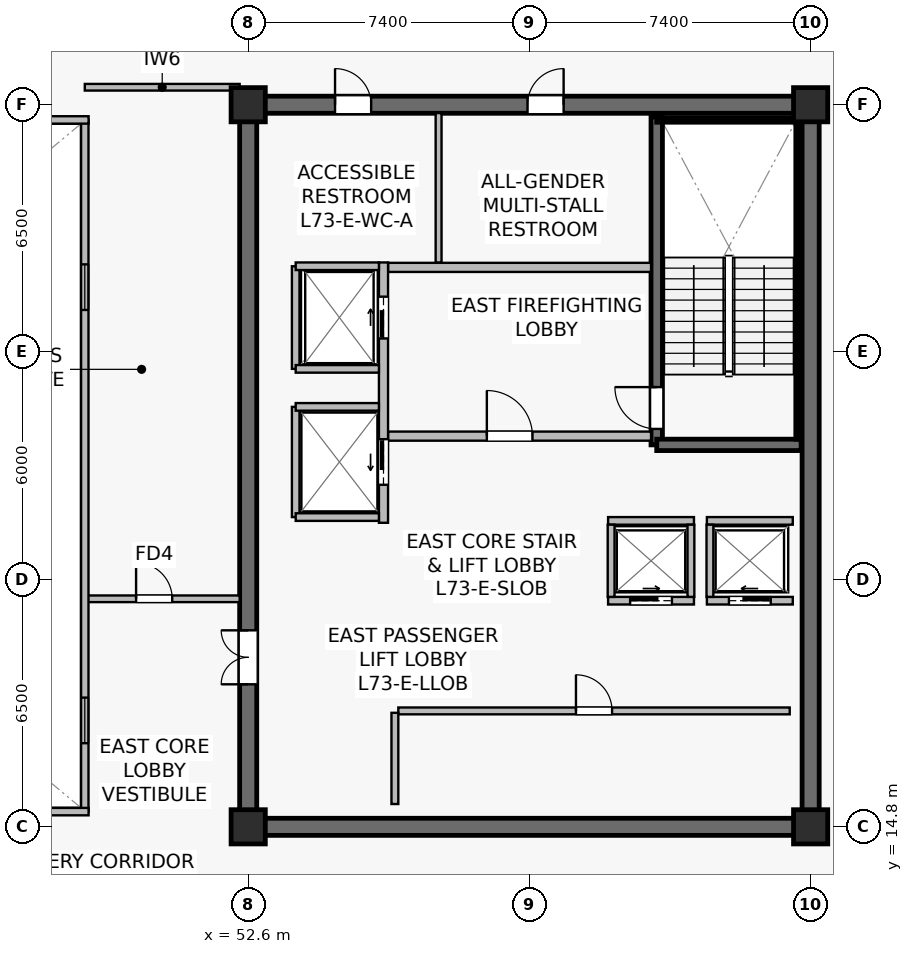
"""IFC4 building model, lengths in metres.
Left out: names, types, materials, properties, quantities, classifications, styles, units other than length and angle.
Written with IfcOpenShell. Run it as: python <this file> out.ifc"""

import sys

from ifc_helpers import new_model, si_unit, direction, frame, frame_2d, origin, origin_2d, place, context, subcontext, project, spatial, rectangle, extrude, source, transform, mapped, element, fill, save


model = new_model("IFC4")
c1 = context("Model", 3, precision=1e-05, world=origin(), true_north=direction((0.0, 1.0)))
c2 = subcontext(c1, "Body", "Model", "MODEL_VIEW")
j1 = project(units=[si_unit("LENGTHUNIT", "METRE"), si_unit("PLANEANGLEUNIT", "RADIAN")], contexts=[c1])
p1 = place(None, origin())
s1 = spatial("IfcSite", under=j1, at=p1, CompositionType="ELEMENT")
p2 = place(p1, origin())
s2 = spatial("IfcBuilding", under=s1, at=p2, CompositionType="ELEMENT")
p3 = place(p2, frame((0.0, 0.0, 306.0)))
s3 = spatial("IfcBuildingStorey", under=s2, at=p3, CompositionType="ELEMENT", Elevation=306.0)
p4 = place(p3, frame((52.375, 14.8, 0.0), z_axis=(0.0, 0.0, 1.0), x_axis=(1.0, 0.0, 0.0)))
e1 = element("IfcWall", 1, at=p4, inside=s3, PredefinedType="SHEAR", context=c2, shape_type="SweptSolid", body=[
    extrude(rectangle(XDim=15.25, YDim=0.45, at=frame_2d((7.625, 0.0))), origin(), (0.0, 0.0, 1.0), 3.9),
])
p5 = place(p3, frame((52.375, 33.8, 0.0), z_axis=(0.0, 0.0, 1.0), x_axis=(1.0, 0.0, 0.0)))
e2 = element("IfcWall", 2, at=p5, inside=s3, PredefinedType="SHEAR", context=c2, shape_type="SweptSolid", body=[
    extrude(rectangle(XDim=15.25, YDim=0.45, at=frame_2d((7.625, 0.0))), origin(), (0.0, 0.0, 1.0), 3.9),
])
p6 = place(p5, frame((7.575, 0.0, 0.0)))
e3 = element("IfcOpeningElement", 3, at=p6, cuts=e2, PredefinedType="OPENING", context=c2, shape_type="SweptSolid", body=[
    extrude(rectangle(XDim=0.95, YDim=2.15, at=frame_2d((0.475, 1.075))), frame((0.0, 0.235, 0.0), z_axis=(0.0, -1.0, 0.0), x_axis=(1.0, 0.0, 0.0)), (0.0, 0.0, 1.0), 0.47),
])
p7 = place(p5, frame((2.51, 0.0, 0.0)))
e4 = element("IfcOpeningElement", 4, at=p7, cuts=e2, PredefinedType="OPENING", context=c2, shape_type="SweptSolid", body=[
    extrude(rectangle(XDim=0.95, YDim=2.15, at=frame_2d((0.475, 1.075))), frame((0.0, 0.235, 0.0), z_axis=(0.0, -1.0, 0.0), x_axis=(1.0, 0.0, 0.0)), (0.0, 0.0, 1.0), 0.47),
])
p8 = place(p3, frame((52.6, 15.025, 0.0), z_axis=(0.0, 0.0, 1.0), x_axis=(0.0, 1.0, 0.0)))
e5 = element("IfcWall", 5, at=p8, inside=s3, PredefinedType="SHEAR", context=c2, shape_type="SweptSolid", body=[
    extrude(rectangle(XDim=18.55, YDim=0.45, at=frame_2d((9.275, 0.0))), origin(), (0.0, 0.0, 1.0), 3.9),
])
p9 = place(p8, frame((3.525, 0.0, 0.0)))
e6 = element("IfcOpeningElement", 6, at=p9, cuts=e5, PredefinedType="OPENING", context=c2, shape_type="SweptSolid", body=[
    extrude(rectangle(XDim=1.42, YDim=2.2, at=frame_2d((0.71, 1.1))), frame((0.0, 0.235, 0.0), z_axis=(0.0, -1.0, 0.0), x_axis=(1.0, 0.0, 0.0)), (0.0, 0.0, 1.0), 0.47),
])
p10 = place(p3, frame((67.4, 15.025, 0.0), z_axis=(0.0, 0.0, 1.0), x_axis=(0.0, 1.0, 0.0)))
e7 = element("IfcWall", 7, at=p10, inside=s3, PredefinedType="SHEAR", context=c2, shape_type="SweptSolid", body=[
    extrude(rectangle(XDim=18.55, YDim=0.45, at=frame_2d((9.275, 0.0))), origin(), (0.0, 0.0, 1.0), 3.9),
])
p11 = place(p3, frame((63.35, 24.85, 0.0), z_axis=(0.0, 0.0, 1.0), x_axis=(0.0, 1.0, 0.0)))
e8 = element("IfcWall", 8, at=p11, inside=s3, PredefinedType="SHEAR", context=c2, shape_type="SweptSolid", body=[
    extrude(rectangle(XDim=8.63, YDim=0.3, at=frame_2d((4.315, 0.0))), origin(), (0.0, 0.0, 1.0), 3.9),
])
p12 = place(p11, frame((0.42, 0.0, 0.0)))
e9 = element("IfcOpeningElement", 9, at=p12, cuts=e8, PredefinedType="OPENING", context=c2, shape_type="SweptSolid", body=[
    extrude(rectangle(XDim=1.1, YDim=2.15, at=frame_2d((0.55, 1.075))), frame((0.0, 0.16, 0.0), z_axis=(0.0, -1.0, 0.0), x_axis=(1.0, 0.0, 0.0)), (0.0, 0.0, 1.0), 0.32),
])
p13 = place(p3, frame((63.35, 24.85, 0.0), z_axis=(0.0, 0.0, 1.0), x_axis=(1.0, 0.0, 0.0)))
e10 = element("IfcWall", 10, at=p13, inside=s3, PredefinedType="SHEAR", context=c2, shape_type="SweptSolid", body=[
    extrude(rectangle(XDim=3.8, YDim=0.3, at=frame_2d((1.9, 0.0))), origin(), (0.0, 0.0, 1.0), 3.9),
])
p14 = place(p3, frame((63.35, 33.4, 0.0), z_axis=(0.0, 0.0, 1.0), x_axis=(1.0, 0.0, 0.0)))
e11 = element("IfcWall", 11, at=p14, inside=s3, PredefinedType="SOLIDWALL", context=c2, shape_type="SweptSolid", body=[
    extrude(rectangle(XDim=3.72, YDim=0.12, at=frame_2d((1.86, 0.0))), origin(), (0.0, 0.0, 1.0), 3.9),
])
p15 = place(p3, frame((67.07, 25.0, 0.0), z_axis=(0.0, 0.0, 1.0), x_axis=(0.0, 1.0, 0.0)))
e12 = element("IfcWall", 12, at=p15, inside=s3, PredefinedType="SOLIDWALL", context=c2, shape_type="SweptSolid", body=[
    extrude(rectangle(XDim=8.32, YDim=0.12, at=frame_2d((4.16, 0.0))), origin(), (0.0, 0.0, 1.0), 3.9),
])
m1 = source(origin(), c2, "Body", "SweptSolid", [
    extrude(rectangle(XDim=0.9, YDim=0.9, at=origin_2d()), origin(), (0.0, 0.0, 1.0), 4.2),
])
for number, where, z_axis, x_axis in (
    (13, (52.6, 14.8, 0.0), (0.0, 0.0, 1.0), (1.0, 0.0, 0.0)),
    (14, (67.4, 14.8, 0.0), (0.0, 0.0, 1.0), (1.0, 0.0, 0.0)),
    (15, (52.6, 33.8, 0.0), (0.0, 0.0, 1.0), (1.0, 0.0, 0.0)),
    (16, (67.4, 33.8, 0.0), (0.0, 0.0, 1.0), (1.0, 0.0, 0.0)),
):
    element("IfcColumn", number, at=place(p3, frame(where, z_axis=z_axis, x_axis=x_axis)), inside=s3, PredefinedType="COLUMN", context=c2, shape_type="MappedRepresentation", body=[
        mapped(m1, transform((0.0, 0.0, 0.0), scale=1.0)),
    ])
p16 = place(p3, frame((56.28, 25.08, 0.0), z_axis=(0.0, 0.0, 1.0), x_axis=(1.0, 0.0, 0.0)))
e17 = element("IfcWall", 17, at=p16, inside=s3, PredefinedType="SOLIDWALL", context=c2, shape_type="SweptSolid", body=[
    extrude(rectangle(XDim=6.92, YDim=0.24, at=frame_2d((3.46, 0.0))), origin(), (0.0, 0.0, 1.0), 3.297),
])
p17 = place(p16, frame((2.6, 0.0, 0.0)))
e18 = element("IfcOpeningElement", 18, at=p17, cuts=e17, PredefinedType="OPENING", context=c2, shape_type="SweptSolid", body=[
    extrude(rectangle(XDim=1.2, YDim=2.16, at=frame_2d((0.6, 1.08))), frame((0.0, 0.13, 0.0), z_axis=(0.0, -1.0, 0.0), x_axis=(1.0, 0.0, 0.0)), (0.0, 0.0, 1.0), 0.26),
])
p18 = place(p3, frame((56.28, 29.52, 0.0), z_axis=(0.0, 0.0, 1.0), x_axis=(1.0, 0.0, 0.0)))
e19 = element("IfcWall", 19, at=p18, inside=s3, PredefinedType="SOLIDWALL", context=c2, shape_type="SweptSolid", body=[
    extrude(rectangle(XDim=6.92, YDim=0.24, at=frame_2d((3.46, 0.0))), origin(), (0.0, 0.0, 1.0), 3.297),
])
p19 = place(p3, frame((56.16, 22.8, 0.0), z_axis=(0.0, 0.0, 1.0), x_axis=(0.0, 1.0, 0.0)))
e20 = element("IfcWall", 20, at=p19, inside=s3, PredefinedType="SOLIDWALL", context=c2, shape_type="SweptSolid", body=[
    extrude(rectangle(XDim=6.85, YDim=0.24, at=frame_2d((3.425, 0.0))), origin(), (0.0, 0.0, 1.0), 3.035),
])
p20 = place(p19, frame((4.85, 0.0, 0.0)))
e21 = element("IfcOpeningElement", 21, at=p20, cuts=e20, PredefinedType="OPENING", context=c2, shape_type="SweptSolid", body=[
    extrude(rectangle(XDim=1.1, YDim=2.22, at=frame_2d((0.55, 1.11))), frame((0.0, 0.13, 0.0), z_axis=(0.0, -1.0, 0.0), x_axis=(1.0, 0.0, 0.0)), (0.0, 0.0, 1.0), 0.26),
])
p21 = place(p19, frame((1.0, 0.0, 0.0)))
e22 = element("IfcOpeningElement", 22, at=p21, cuts=e20, PredefinedType="OPENING", context=c2, shape_type="SweptSolid", body=[
    extrude(rectangle(XDim=1.2, YDim=2.22, at=frame_2d((0.6, 1.11))), frame((0.0, 0.13, 0.0), z_axis=(0.0, -1.0, 0.0), x_axis=(1.0, 0.0, 0.0)), (0.0, 0.0, 1.0), 0.26),
])
p22 = place(p3, frame((64.67, 20.75, 0.0), z_axis=(0.0, 0.0, 1.0), x_axis=(1.0, 0.0, 0.0)))
e23 = element("IfcWall", 23, at=p22, inside=s3, PredefinedType="SOLIDWALL", context=c2, shape_type="SweptSolid", body=[
    extrude(rectangle(XDim=2.26, YDim=0.2, at=frame_2d((1.13, 0.0))), origin(), (0.0, 0.0, 1.0), 3.9),
])
p23 = place(p22, frame((0.58, 0.0, 0.0)))
e24 = element("IfcOpeningElement", 24, at=p23, cuts=e23, PredefinedType="OPENING", context=c2, shape_type="SweptSolid", body=[
    extrude(rectangle(XDim=1.1, YDim=2.22, at=frame_2d((0.55, 1.11))), frame((0.0, 0.11, 0.0), z_axis=(0.0, -1.0, 0.0), x_axis=(1.0, 0.0, 0.0)), (0.0, 0.0, 1.0), 0.22),
])
p24 = place(p3, frame((64.67, 22.85, 0.0), z_axis=(0.0, 0.0, 1.0), x_axis=(1.0, 0.0, 0.0)))
e25 = element("IfcWall", 25, at=p24, inside=s3, PredefinedType="SOLIDWALL", context=c2, shape_type="SweptSolid", body=[
    extrude(rectangle(XDim=2.26, YDim=0.2, at=frame_2d((1.13, 0.0))), origin(), (0.0, 0.0, 1.0), 3.9),
])
p25 = place(p3, frame((64.75, 20.85, 0.0), z_axis=(0.0, 0.0, 1.0), x_axis=(0.0, 1.0, 0.0)))
e26 = element("IfcWall", 26, at=p25, inside=s3, PredefinedType="SOLIDWALL", context=c2, shape_type="SweptSolid", body=[
    extrude(rectangle(XDim=1.9, YDim=0.18, at=frame_2d((0.95, 0.0))), origin(), (0.0, 0.0, 1.0), 3.9),
])
p26 = place(p3, frame((62.07, 20.75, 0.0), z_axis=(0.0, 0.0, 1.0), x_axis=(1.0, 0.0, 0.0)))
e27 = element("IfcWall", 27, at=p26, inside=s3, PredefinedType="SOLIDWALL", context=c2, shape_type="SweptSolid", body=[
    extrude(rectangle(XDim=2.26, YDim=0.2, at=frame_2d((1.13, 0.0))), origin(), (0.0, 0.0, 1.0), 3.9),
])
p27 = place(p26, frame((0.58, 0.0, 0.0)))
e28 = element("IfcOpeningElement", 28, at=p27, cuts=e27, PredefinedType="OPENING", context=c2, shape_type="SweptSolid", body=[
    extrude(rectangle(XDim=1.1, YDim=2.22, at=frame_2d((0.55, 1.11))), frame((0.0, 0.11, 0.0), z_axis=(0.0, -1.0, 0.0), x_axis=(1.0, 0.0, 0.0)), (0.0, 0.0, 1.0), 0.22),
])
p28 = place(p3, frame((62.07, 22.85, 0.0), z_axis=(0.0, 0.0, 1.0), x_axis=(1.0, 0.0, 0.0)))
e29 = element("IfcWall", 29, at=p28, inside=s3, PredefinedType="SOLIDWALL", context=c2, shape_type="SweptSolid", body=[
    extrude(rectangle(XDim=2.26, YDim=0.2, at=frame_2d((1.13, 0.0))), origin(), (0.0, 0.0, 1.0), 3.9),
])
for number, where, z_axis, x_axis in (
    (30, (62.15, 20.85, 0.0), (0.0, 0.0, 1.0), (0.0, 1.0, 0.0)),
    (31, (64.25, 20.85, 0.0), (0.0, 0.0, 1.0), (0.0, 1.0, 0.0)),
):
    element("IfcWall", number, at=place(p3, frame(where, z_axis=z_axis, x_axis=x_axis)), inside=s3, PredefinedType="SOLIDWALL", context=c2, shape_type="SweptSolid", body=[
        extrude(rectangle(XDim=1.9, YDim=0.18, at=frame_2d((0.95, 0.0))), origin(), (0.0, 0.0, 1.0), 3.9),
    ])
p29 = place(p3, frame((53.85, 26.85, 0.0), z_axis=(0.0, 0.0, 1.0), x_axis=(0.0, 1.0, 0.0)))
e32 = element("IfcWall", 32, at=p29, inside=s3, PredefinedType="SOLIDWALL", context=c2, shape_type="SweptSolid", body=[
    extrude(rectangle(XDim=2.7, YDim=0.2, at=frame_2d((1.35, 0.0))), origin(), (0.0, 0.0, 1.0), 3.9),
])
p30 = place(p3, frame((53.85, 29.55, 0.0), z_axis=(0.0, 0.0, 1.0), x_axis=(1.0, 0.0, 0.0)))
e33 = element("IfcWall", 33, at=p30, inside=s3, PredefinedType="SOLIDWALL", context=c2, shape_type="SweptSolid", body=[
    extrude(rectangle(XDim=2.19, YDim=0.2, at=frame_2d((1.095, 0.0))), origin(), (0.0, 0.0, 1.0), 3.9),
])
p31 = place(p3, frame((53.85, 26.85, 0.0), z_axis=(0.0, 0.0, 1.0), x_axis=(1.0, 0.0, 0.0)))
e34 = element("IfcWall", 34, at=p31, inside=s3, PredefinedType="SOLIDWALL", context=c2, shape_type="SweptSolid", body=[
    extrude(rectangle(XDim=2.19, YDim=0.2, at=frame_2d((1.095, 0.0))), origin(), (0.0, 0.0, 1.0), 3.297),
])
p32 = place(p3, frame((53.85, 22.95, 0.0), z_axis=(0.0, 0.0, 1.0), x_axis=(0.0, 1.0, 0.0)))
e35 = element("IfcWall", 35, at=p32, inside=s3, PredefinedType="SOLIDWALL", context=c2, shape_type="SweptSolid", body=[
    extrude(rectangle(XDim=2.9, YDim=0.2, at=frame_2d((1.45, 0.0))), origin(), (0.0, 0.0, 1.0), 3.035),
])
for number, where, z_axis, x_axis in (
    (36, (53.85, 25.85, 0.0), (0.0, 0.0, 1.0), (1.0, 0.0, 0.0)),
    (37, (53.85, 22.95, 0.0), (0.0, 0.0, 1.0), (1.0, 0.0, 0.0)),
):
    element("IfcWall", number, at=place(p3, frame(where, z_axis=z_axis, x_axis=x_axis)), inside=s3, PredefinedType="SOLIDWALL", context=c2, shape_type="SweptSolid", body=[
        extrude(rectangle(XDim=2.19, YDim=0.2, at=frame_2d((1.095, 0.0))), origin(), (0.0, 0.0, 1.0), 3.9),
    ])
p33 = place(p3, frame((56.55, 17.85, 0.0), z_axis=(0.0, 0.0, 1.0), x_axis=(1.0, 0.0, 0.0)))
e38 = element("IfcWall", 38, at=p33, inside=s3, PredefinedType="SOLIDWALL", context=c2, shape_type="SweptSolid", body=[
    extrude(rectangle(XDim=10.3, YDim=0.18, at=frame_2d((5.15, 0.0))), origin(), (0.0, 0.0, 1.0), 3.297),
])
p34 = place(p33, frame((4.675, 0.0, 0.0)))
e39 = element("IfcOpeningElement", 39, at=p34, cuts=e38, PredefinedType="OPENING", context=c2, shape_type="SweptSolid", body=[
    extrude(rectangle(XDim=0.95, YDim=2.15, at=frame_2d((0.475, 1.075))), frame((0.0, 0.1, 0.0), z_axis=(0.0, -1.0, 0.0), x_axis=(1.0, 0.0, 0.0)), (0.0, 0.0, 1.0), 0.2),
])
p35 = place(p3, frame((56.46, 15.4, 0.0), z_axis=(0.0, 0.0, 1.0), x_axis=(0.0, 1.0, 0.0)))
e40 = element("IfcWall", 40, at=p35, inside=s3, PredefinedType="SOLIDWALL", context=c2, shape_type="SweptSolid", body=[
    extrude(rectangle(XDim=2.4, YDim=0.18, at=frame_2d((1.2, 0.0))), origin(), (0.0, 0.0, 1.0), 3.9),
])
p36 = place(p3, frame((57.61, 29.65, 0.0), z_axis=(0.0, 0.0, 1.0), x_axis=(0.0, 1.0, 0.0)))
e41 = element("IfcWall", 41, at=p36, inside=s3, PredefinedType="PLUMBINGWALL", context=c2, shape_type="SweptSolid", body=[
    extrude(rectangle(XDim=3.93, YDim=0.155, at=frame_2d((1.965, 0.0))), origin(), (0.0, 0.0, 1.0), 3.9),
])
p37 = place(p3, frame((48.3, 34.26, 0.0), z_axis=(0.0, 0.0, 1.0), x_axis=(1.0, 0.0, 0.0)))
e42 = element("IfcWall", 42, at=p37, inside=s3, PredefinedType="PARTITIONING", context=c2, shape_type="SweptSolid", body=[
    extrude(rectangle(XDim=4.075, YDim=0.175, at=frame_2d((2.038, 0.0))), origin(), (0.0, 0.0, 1.0), 3.635),
])
p38 = place(p3, frame((48.3, 20.8, 0.0), z_axis=(0.0, 0.0, 1.0), x_axis=(1.0, 0.0, 0.0)))
e43 = element("IfcWall", 43, at=p38, inside=s3, PredefinedType="PARTITIONING", context=c2, shape_type="SweptSolid", body=[
    extrude(rectangle(XDim=4.075, YDim=0.175, at=frame_2d((2.038, 0.0))), origin(), (0.0, 0.0, 1.0), 3.9),
])
p39 = place(p38, frame((1.35, 0.0, 0.0)))
e44 = element("IfcOpeningElement", 44, at=p39, cuts=e43, PredefinedType="OPENING", context=c2, shape_type="SweptSolid", body=[
    extrude(rectangle(XDim=0.95, YDim=2.15, at=frame_2d((0.475, 1.075))), frame((0.0, 0.098, 0.0), z_axis=(0.0, -1.0, 0.0), x_axis=(1.0, 0.0, 0.0)), (0.0, 0.0, 1.0), 0.195),
])
p40 = place(p3, frame((48.3, 15.2, 0.0), z_axis=(0.0, 0.0, 1.0), x_axis=(0.0, 1.0, 0.0)))
e45 = element("IfcWall", 45, at=p40, inside=s3, PredefinedType="SOLIDWALL", context=c2, shape_type="SweptSolid", body=[
    extrude(rectangle(XDim=18.2, YDim=0.195, at=frame_2d((9.1, 0.0))), origin(), (0.0, 0.0, 1.0), 3.9),
])
p41 = place(p40, frame((1.8, 0.0, 0.9)))
e46 = element("IfcOpeningElement", 46, at=p41, cuts=e45, PredefinedType="OPENING", context=c2, shape_type="SweptSolid", body=[
    extrude(rectangle(XDim=1.2, YDim=1.35, at=frame_2d((0.6, 0.675))), frame((0.0, 0.107, 0.0), z_axis=(0.0, -1.0, 0.0), x_axis=(1.0, 0.0, 0.0)), (0.0, 0.0, 1.0), 0.215),
])
p42 = place(p40, frame((13.2, 0.0, 0.9)))
e47 = element("IfcOpeningElement", 47, at=p42, cuts=e45, PredefinedType="OPENING", context=c2, shape_type="SweptSolid", body=[
    extrude(rectangle(XDim=1.2, YDim=1.35, at=frame_2d((0.6, 0.675))), frame((0.0, 0.107, 0.0), z_axis=(0.0, -1.0, 0.0), x_axis=(1.0, 0.0, 0.0)), (0.0, 0.0, 1.0), 0.215),
])
for number, where, z_axis, x_axis in (
    (48, (26.4, 15.2, 0.0), (0.0, 0.0, 1.0), (1.0, 0.0, 0.0)),
    (49, (26.4, 33.4, 0.0), (0.0, 0.0, 1.0), (1.0, 0.0, 0.0)),
):
    element("IfcWall", number, at=place(p3, frame(where, z_axis=z_axis, x_axis=x_axis)), inside=s3, PredefinedType="SOLIDWALL", context=c2, shape_type="SweptSolid", body=[
        extrude(rectangle(XDim=22.0, YDim=0.195, at=frame_2d((11.0, 0.0))), origin(), (0.0, 0.0, 1.0), 3.9),
    ])
m2 = source(origin(), c2, "Body", "SweptSolid", [
    extrude(rectangle(XDim=1.2, YDim=1.35, at=frame_2d((0.6, 0.675))), frame((0.0, 0.03, 0.0), z_axis=(0.0, -1.0, 0.0), x_axis=(1.0, 0.0, 0.0)), (0.0, 0.0, 1.0), 0.06),
])
p43 = place(p41, origin())
e50 = element("IfcWindow", 50, at=p43, inside=s3, PartitioningType="SINGLE_PANEL", PredefinedType="WINDOW", context=c2, shape_type="MappedRepresentation", body=[
    mapped(m2, transform((0.0, 0.0, 0.0), scale=1.0)),
])
fill(e46, e50)
p44 = place(p42, origin())
e51 = element("IfcWindow", 51, at=p44, inside=s3, PartitioningType="SINGLE_PANEL", PredefinedType="WINDOW", context=c2, shape_type="MappedRepresentation", body=[
    mapped(m2, transform((0.0, 0.0, 0.0), scale=1.0)),
])
fill(e47, e51)
m3 = source(origin(), c2, "Body", "SweptSolid", [
    extrude(rectangle(XDim=1.1, YDim=2.15, at=frame_2d((0.55, 1.075))), frame((0.0, 0.025, 0.0), z_axis=(0.0, -1.0, 0.0), x_axis=(1.0, 0.0, 0.0)), (0.0, 0.0, 1.0), 0.05),
])
p45 = place(p12, origin())
e52 = element("IfcDoor", 52, at=p45, inside=s3, OperationType="SINGLE_SWING_RIGHT", PredefinedType="DOOR", context=c2, shape_type="MappedRepresentation", body=[
    mapped(m3, transform((0.0, 0.0, 0.0), scale=1.0)),
])
fill(e9, e52)
m4 = source(origin(), c2, "Body", "SweptSolid", [
    extrude(rectangle(XDim=1.2, YDim=2.16, at=frame_2d((0.6, 1.08))), frame((0.0, 0.025, 0.0), z_axis=(0.0, -1.0, 0.0), x_axis=(1.0, 0.0, 0.0)), (0.0, 0.0, 1.0), 0.05),
])
p46 = place(p17, origin())
e53 = element("IfcDoor", 53, at=p46, inside=s3, OperationType="SINGLE_SWING_LEFT", PredefinedType="DOOR", context=c2, shape_type="MappedRepresentation", body=[
    mapped(m4, transform((0.0, 0.0, 0.0), scale=1.0)),
])
fill(e18, e53)
m5 = source(origin(), c2, "Body", "SweptSolid", [
    extrude(rectangle(XDim=1.1, YDim=2.22, at=frame_2d((0.55, 1.11))), frame((0.0, 0.025, 0.0), z_axis=(0.0, -1.0, 0.0), x_axis=(1.0, 0.0, 0.0)), (0.0, 0.0, 1.0), 0.05),
])
p47 = place(p23, origin())
e54 = element("IfcDoor", 54, at=p47, inside=s3, OperationType="SLIDING_TO_LEFT", PredefinedType="USERDEFINED", context=c2, shape_type="MappedRepresentation", body=[
    mapped(m5, transform((0.0, 0.0, 0.0), scale=1.0)),
])
fill(e24, e54)
p48 = place(p27, origin())
e55 = element("IfcDoor", 55, at=p48, inside=s3, OperationType="SLIDING_TO_RIGHT", PredefinedType="USERDEFINED", context=c2, shape_type="MappedRepresentation", body=[
    mapped(m5, transform((0.0, 0.0, 0.0), scale=1.0)),
])
fill(e28, e55)
p49 = place(p20, origin())
e56 = element("IfcDoor", 56, at=p49, inside=s3, OperationType="SLIDING_TO_RIGHT", PredefinedType="USERDEFINED", context=c2, shape_type="MappedRepresentation", body=[
    mapped(m5, transform((0.0, 0.0, 0.0), scale=1.0)),
])
fill(e21, e56)
m6 = source(origin(), c2, "Body", "SweptSolid", [
    extrude(rectangle(XDim=1.2, YDim=2.22, at=frame_2d((0.6, 1.11))), frame((0.0, 0.025, 0.0), z_axis=(0.0, -1.0, 0.0), x_axis=(1.0, 0.0, 0.0)), (0.0, 0.0, 1.0), 0.05),
])
p50 = place(p21, origin())
e57 = element("IfcDoor", 57, at=p50, inside=s3, OperationType="SLIDING_TO_LEFT", PredefinedType="USERDEFINED", context=c2, shape_type="MappedRepresentation", body=[
    mapped(m6, transform((0.0, 0.0, 0.0), scale=1.0)),
])
fill(e22, e57)
m7 = source(origin(), c2, "Body", "SweptSolid", [
    extrude(rectangle(XDim=0.95, YDim=2.15, at=frame_2d((0.475, 1.075))), frame((0.0, 0.025, 0.0), z_axis=(0.0, -1.0, 0.0), x_axis=(1.0, 0.0, 0.0)), (0.0, 0.0, 1.0), 0.05),
])
p51 = place(p34, origin())
e58 = element("IfcDoor", 58, at=p51, inside=s3, OperationType="SINGLE_SWING_LEFT", PredefinedType="DOOR", context=c2, shape_type="MappedRepresentation", body=[
    mapped(m7, transform((0.0, 0.0, 0.0), scale=1.0)),
])
fill(e39, e58)
m8 = source(origin(), c2, "Body", "SweptSolid", [
    extrude(rectangle(XDim=1.42, YDim=2.2, at=frame_2d((0.71, 1.1))), frame((0.0, 0.025, 0.0), z_axis=(0.0, -1.0, 0.0), x_axis=(1.0, 0.0, 0.0)), (0.0, 0.0, 1.0), 0.05),
])
p52 = place(p9, origin())
e59 = element("IfcDoor", 59, at=p52, inside=s3, OperationType="DOUBLE_DOOR_SINGLE_SWING", PredefinedType="DOOR", context=c2, shape_type="MappedRepresentation", body=[
    mapped(m8, transform((0.0, 0.0, 0.0), scale=1.0)),
])
fill(e6, e59)
p53 = place(p6, origin())
e60 = element("IfcDoor", 60, at=p53, inside=s3, OperationType="SINGLE_SWING_RIGHT", PredefinedType="DOOR", context=c2, shape_type="MappedRepresentation", body=[
    mapped(m7, transform((0.0, 0.0, 0.0), scale=1.0)),
])
fill(e3, e60)
p54 = place(p7, origin())
e61 = element("IfcDoor", 61, at=p54, inside=s3, OperationType="SINGLE_SWING_LEFT", PredefinedType="DOOR", context=c2, shape_type="MappedRepresentation", body=[
    mapped(m7, transform((0.0, 0.0, 0.0), scale=1.0)),
])
fill(e4, e61)
p55 = place(p39, origin())
e62 = element("IfcDoor", 62, at=p55, inside=s3, OperationType="SINGLE_SWING_LEFT", PredefinedType="DOOR", context=c2, shape_type="MappedRepresentation", body=[
    mapped(m7, transform((0.0, 0.0, 0.0), scale=1.0)),
])
fill(e44, e62)
save(model, sys.argv[1])
